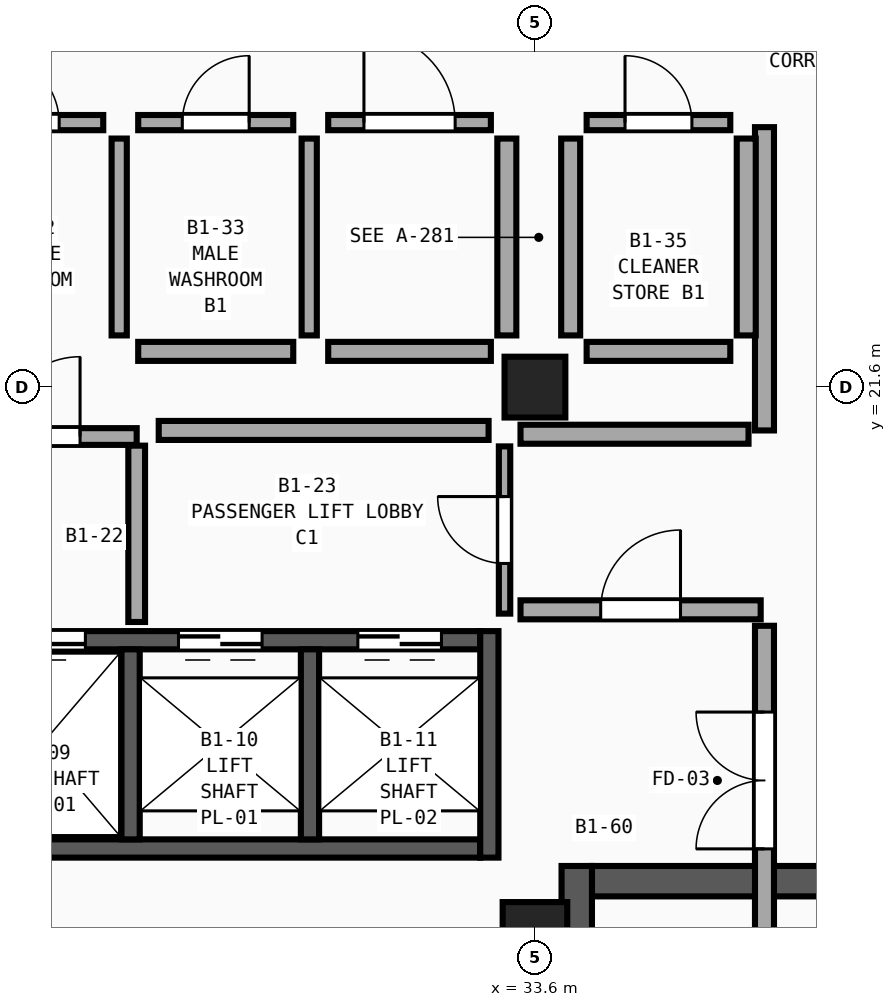
"""IFC4 building model, lengths in metres.
Left out: names, types, materials, properties, quantities, classifications, styles, units other than length and angle.
Written with IfcOpenShell. Run it as: python <this file> out.ifc"""

import sys

from ifc_helpers import new_model, si_unit, direction, frame, frame_2d, origin, origin_2d, place, context, subcontext, project, spatial, rectangle, extrude, element, fill, save


model = new_model("IFC4")
c1 = context("Model", 3, precision=1e-05, world=origin(), true_north=direction((0.0, 1.0)))
c2 = subcontext(c1, "Body", "Model", "MODEL_VIEW")
j1 = project(units=[si_unit("LENGTHUNIT", "METRE"), si_unit("PLANEANGLEUNIT", "RADIAN")], contexts=[c1])
p1 = place(None, origin())
s1 = spatial("IfcSite", under=j1, at=p1, CompositionType="ELEMENT")
p2 = place(p1, origin())
s2 = spatial("IfcBuilding", under=s1, at=p2, CompositionType="ELEMENT")
p3 = place(p2, frame((0.0, 0.0, -5.4)))
s3 = spatial("IfcBuildingStorey", under=s2, at=p3, CompositionType="ELEMENT", Elevation=-5.4)
p4 = place(p3, frame((33.6, 14.4, 0.0), z_axis=(0.0, 0.0, 1.0), x_axis=(1.0, 0.0, 0.0)))
e1 = element("IfcColumn", 1, at=p4, inside=s3, PredefinedType="COLUMN", context=c2, shape_type="SweptSolid", body=[
    extrude(rectangle(XDim=0.85, YDim=0.85, at=origin_2d()), origin(), (0.0, 0.0, 1.0), 5.4),
])
p5 = place(p3, frame((33.6, 21.6, 0.0), z_axis=(0.0, 0.0, 1.0), x_axis=(1.0, 0.0, 0.0)))
e2 = element("IfcColumn", 2, at=p5, inside=s3, PredefinedType="COLUMN", context=c2, shape_type="SweptSolid", body=[
    extrude(rectangle(XDim=0.8, YDim=0.8, at=origin_2d()), origin(), (0.0, 0.0, 1.0), 5.4),
])
p6 = place(p3, frame((34.35, 15.1, 0.0), z_axis=(0.0, 0.0, 1.0), x_axis=(1.0, 0.0, 0.0)))
e3 = element("IfcWall", 3, at=p6, inside=s3, PredefinedType="SHEAR", context=c2, shape_type="SweptSolid", body=[
    extrude(rectangle(XDim=6.9, YDim=0.4, at=frame_2d((3.45, 0.0))), origin(), (0.0, 0.0, 1.0), 5.4),
])
p7 = place(p3, frame((34.15, 15.3, 0.0), z_axis=(0.0, 0.0, 1.0), x_axis=(0.0, -1.0, 0.0)))
e4 = element("IfcWall", 4, at=p7, inside=s3, PredefinedType="SHEAR", context=c2, shape_type="SweptSolid", body=[
    extrude(rectangle(XDim=8.05, YDim=0.4, at=frame_2d((4.025, 0.0))), origin(), (0.0, 0.0, 1.0), 5.4),
])
p8 = place(p3, frame((32.88, 18.27, 0.0), z_axis=(0.0, 0.0, 1.0), x_axis=(-1.0, 0.0, 0.0)))
e5 = element("IfcWall", 5, at=p8, inside=s3, PredefinedType="SHEAR", context=c2, shape_type="SweptSolid", body=[
    extrude(rectangle(XDim=6.82, YDim=0.24, at=frame_2d((3.41, 0.0))), origin(), (0.0, 0.0, 1.0), 5.05),
])
p9 = place(p8, frame((5.195, 0.0, 0.0)))
e6 = element("IfcOpeningElement", 6, at=p9, cuts=e5, PredefinedType="OPENING", context=c2, shape_type="SweptSolid", body=[
    extrude(rectangle(XDim=1.15, YDim=2.25, at=frame_2d((0.575, 1.125))), frame((0.0, 0.14, 0.0), z_axis=(0.0, -1.0, 0.0), x_axis=(1.0, 0.0, 0.0)), (0.0, 0.0, 1.0), 0.28),
])
p10 = place(p8, frame((2.87, 0.0, 0.0)))
e7 = element("IfcOpeningElement", 7, at=p10, cuts=e5, PredefinedType="OPENING", context=c2, shape_type="SweptSolid", body=[
    extrude(rectangle(XDim=1.1, YDim=2.2, at=frame_2d((0.55, 1.1))), frame((0.0, 0.14, 0.0), z_axis=(0.0, -1.0, 0.0), x_axis=(1.0, 0.0, 0.0)), (0.0, 0.0, 1.0), 0.28),
])
p11 = place(p8, frame((0.51, 0.0, 0.0)))
e8 = element("IfcOpeningElement", 8, at=p11, cuts=e5, PredefinedType="OPENING", context=c2, shape_type="SweptSolid", body=[
    extrude(rectangle(XDim=1.1, YDim=2.2, at=frame_2d((0.55, 1.1))), frame((0.0, 0.14, 0.0), z_axis=(0.0, -1.0, 0.0), x_axis=(1.0, 0.0, 0.0)), (0.0, 0.0, 1.0), 0.28),
])
p12 = place(p3, frame((26.06, 15.53, 0.0), z_axis=(0.0, 0.0, 1.0), x_axis=(1.0, 0.0, 0.0)))
e9 = element("IfcWall", 9, at=p12, inside=s3, PredefinedType="SHEAR", context=c2, shape_type="SweptSolid", body=[
    extrude(rectangle(XDim=6.82, YDim=0.24, at=frame_2d((3.41, 0.0))), origin(), (0.0, 0.0, 1.0), 5.05),
])
p13 = place(p3, frame((33.0, 15.41, 0.0), z_axis=(0.0, 0.0, 1.0), x_axis=(0.0, 1.0, 0.0)))
e10 = element("IfcWall", 10, at=p13, inside=s3, PredefinedType="SHEAR", context=c2, shape_type="SweptSolid", body=[
    extrude(rectangle(XDim=2.98, YDim=0.24, at=frame_2d((1.49, 0.0))), origin(), (0.0, 0.0, 1.0), 5.05),
])
for number, where, z_axis, x_axis in (
    (11, (28.28, 15.65, 0.0), (0.0, 0.0, 1.0), (0.0, 1.0, 0.0)),
    (12, (30.64, 15.65, 0.0), (0.0, 0.0, 1.0), (0.0, 1.0, 0.0)),
):
    element("IfcWall", number, at=place(p3, frame(where, z_axis=z_axis, x_axis=x_axis)), inside=s3, PredefinedType="SHEAR", context=c2, shape_type="SweptSolid", body=[
        extrude(rectangle(XDim=2.5, YDim=0.24, at=frame_2d((1.25, 0.0))), origin(), (0.0, 0.0, 1.0), 5.05),
    ])
p14 = place(p3, frame((25.82, 20.95, 0.0), z_axis=(0.0, 0.0, 1.0), x_axis=(1.0, 0.0, 0.0)))
e13 = element("IfcWall", 13, at=p14, inside=s3, PredefinedType="SOLIDWALL", context=c2, shape_type="SweptSolid", body=[
    extrude(rectangle(XDim=2.54, YDim=0.22, at=frame_2d((1.27, 0.0))), origin(), (0.0, 0.0, 1.0), 4.55),
])
p15 = place(p14, frame((0.745, 0.0, 0.0)))
e14 = element("IfcOpeningElement", 14, at=p15, cuts=e13, PredefinedType="OPENING", context=c2, shape_type="SweptSolid", body=[
    extrude(rectangle(XDim=1.05, YDim=2.15, at=frame_2d((0.525, 1.075))), frame((0.0, 0.13, 0.0), z_axis=(0.0, -1.0, 0.0), x_axis=(1.0, 0.0, 0.0)), (0.0, 0.0, 1.0), 0.26),
])
p16 = place(p3, frame((28.36, 18.51, 0.0), z_axis=(0.0, 0.0, 1.0), x_axis=(0.0, 1.0, 0.0)))
e15 = element("IfcWall", 15, at=p16, inside=s3, PredefinedType="SOLIDWALL", context=c2, shape_type="SweptSolid", body=[
    extrude(rectangle(XDim=2.32, YDim=0.22, at=frame_2d((1.16, 0.0))), origin(), (0.0, 0.0, 1.0), 5.05),
])
p17 = place(p3, frame((28.65, 21.03, 0.0), z_axis=(0.0, 0.0, 1.0), x_axis=(1.0, 0.0, 0.0)))
e16 = element("IfcWall", 16, at=p17, inside=s3, PredefinedType="SOLIDWALL", context=c2, shape_type="SweptSolid", body=[
    extrude(rectangle(XDim=4.34, YDim=0.25, at=frame_2d((2.17, 0.0))), origin(), (0.0, 0.0, 1.0), 4.55),
])
p18 = place(p3, frame((36.62, 14.39, 0.0), z_axis=(0.0, 0.0, 1.0), x_axis=(0.0, 1.0, 0.0)))
e17 = element("IfcWall", 17, at=p18, inside=s3, PredefinedType="SOLIDWALL", context=c2, shape_type="SweptSolid", body=[
    extrude(rectangle(XDim=4.07, YDim=0.25, at=frame_2d((2.035, 0.0))), origin(), (0.0, 0.0, 1.0), 5.05),
])
p19 = place(p18, frame((1.135, 0.0, 0.0)))
e18 = element("IfcOpeningElement", 18, at=p19, cuts=e17, PredefinedType="OPENING", context=c2, shape_type="SweptSolid", body=[
    extrude(rectangle(XDim=1.8, YDim=2.3, at=frame_2d((0.9, 1.15))), frame((0.0, 0.145, 0.0), z_axis=(0.0, -1.0, 0.0), x_axis=(1.0, 0.0, 0.0)), (0.0, 0.0, 1.0), 0.29),
])
p20 = place(p3, frame((36.62, 21.03, 0.0), z_axis=(0.0, 0.0, 1.0), x_axis=(0.0, 1.0, 0.0)))
e19 = element("IfcWall", 19, at=p20, inside=s3, PredefinedType="SOLIDWALL", context=c2, shape_type="SweptSolid", body=[
    extrude(rectangle(XDim=3.99, YDim=0.25, at=frame_2d((1.995, 0.0))), origin(), (0.0, 0.0, 1.0), 5.05),
])
p21 = place(p3, frame((33.41, 18.67, 0.0), z_axis=(0.0, 0.0, 1.0), x_axis=(1.0, 0.0, 0.0)))
e20 = element("IfcWall", 20, at=p21, inside=s3, PredefinedType="SOLIDWALL", context=c2, shape_type="SweptSolid", body=[
    extrude(rectangle(XDim=3.16, YDim=0.25, at=frame_2d((1.58, 0.0))), origin(), (0.0, 0.0, 1.0), 5.05),
])
p22 = place(p21, frame((1.055, 0.0, 0.0)))
e21 = element("IfcOpeningElement", 21, at=p22, cuts=e20, PredefinedType="OPENING", context=c2, shape_type="SweptSolid", body=[
    extrude(rectangle(XDim=1.05, YDim=2.15, at=frame_2d((0.525, 1.075))), frame((0.0, 0.145, 0.0), z_axis=(0.0, -1.0, 0.0), x_axis=(1.0, 0.0, 0.0)), (0.0, 0.0, 1.0), 0.29),
])
p23 = place(p3, frame((33.41, 20.98, 0.0), z_axis=(0.0, 0.0, 1.0), x_axis=(1.0, 0.0, 0.0)))
e22 = element("IfcWall", 22, at=p23, inside=s3, PredefinedType="SOLIDWALL", context=c2, shape_type="SweptSolid", body=[
    extrude(rectangle(XDim=3.0, YDim=0.25, at=frame_2d((1.5, 0.0))), origin(), (0.0, 0.0, 1.0), 4.55),
])
p24 = place(p3, frame((33.2, 18.62, 0.0), z_axis=(0.0, 0.0, 1.0), x_axis=(0.0, 1.0, 0.0)))
e23 = element("IfcWall", 23, at=p24, inside=s3, PredefinedType="PARTITIONING", context=c2, shape_type="SweptSolid", body=[
    extrude(rectangle(XDim=2.2, YDim=0.15, at=frame_2d((1.1, 0.0))), origin(), (0.0, 0.0, 1.0), 4.55),
])
p25 = place(p24, frame((0.66, 0.0, 0.0)))
e24 = element("IfcOpeningElement", 24, at=p25, cuts=e23, PredefinedType="OPENING", context=c2, shape_type="SweptSolid", body=[
    extrude(rectangle(XDim=0.88, YDim=2.45, at=frame_2d((0.44, 1.225))), frame((0.0, 0.095, 0.0), z_axis=(0.0, -1.0, 0.0), x_axis=(1.0, 0.0, 0.0)), (0.0, 0.0, 1.0), 0.19),
])
p26 = place(p3, frame((30.88, 25.08, 0.0), z_axis=(0.0, 0.0, 1.0), x_axis=(1.0, 0.0, 0.0)))
e25 = element("IfcWall", 25, at=p26, inside=s3, PredefinedType="PLUMBINGWALL", context=c2, shape_type="SweptSolid", body=[
    extrude(rectangle(XDim=2.14, YDim=0.2, at=frame_2d((1.07, 0.0))), origin(), (0.0, 0.0, 1.0), 5.05),
])
p27 = place(p26, frame((0.47, 0.0, 0.0)))
e26 = element("IfcOpeningElement", 26, at=p27, cuts=e25, PredefinedType="OPENING", context=c2, shape_type="SweptSolid", body=[
    extrude(rectangle(XDim=1.2, YDim=2.45, at=frame_2d((0.6, 1.225))), frame((0.0, 0.12, 0.0), z_axis=(0.0, -1.0, 0.0), x_axis=(1.0, 0.0, 0.0)), (0.0, 0.0, 1.0), 0.24),
])
p28 = place(p3, frame((25.88, 25.08, 0.0), z_axis=(0.0, 0.0, 1.0), x_axis=(1.0, 0.0, 0.0)))
e27 = element("IfcWall", 27, at=p28, inside=s3, PredefinedType="PLUMBINGWALL", context=c2, shape_type="SweptSolid", body=[
    extrude(rectangle(XDim=2.04, YDim=0.2, at=frame_2d((1.02, 0.0))), origin(), (0.0, 0.0, 1.0), 5.05),
])
p29 = place(p28, frame((0.58, 0.0, 0.0)))
e28 = element("IfcOpeningElement", 28, at=p29, cuts=e27, PredefinedType="OPENING", context=c2, shape_type="SweptSolid", body=[
    extrude(rectangle(XDim=0.88, YDim=2.05, at=frame_2d((0.44, 1.025))), frame((0.0, 0.12, 0.0), z_axis=(0.0, -1.0, 0.0), x_axis=(1.0, 0.0, 0.0)), (0.0, 0.0, 1.0), 0.24),
])
p30 = place(p3, frame((28.38, 25.08, 0.0), z_axis=(0.0, 0.0, 1.0), x_axis=(1.0, 0.0, 0.0)))
e29 = element("IfcWall", 29, at=p30, inside=s3, PredefinedType="PLUMBINGWALL", context=c2, shape_type="SweptSolid", body=[
    extrude(rectangle(XDim=2.04, YDim=0.2, at=frame_2d((1.02, 0.0))), origin(), (0.0, 0.0, 1.0), 5.05),
])
p31 = place(p30, frame((0.58, 0.0, 0.0)))
e30 = element("IfcOpeningElement", 30, at=p31, cuts=e29, PredefinedType="OPENING", context=c2, shape_type="SweptSolid", body=[
    extrude(rectangle(XDim=0.88, YDim=2.05, at=frame_2d((0.44, 1.025))), frame((0.0, 0.12, 0.0), z_axis=(0.0, -1.0, 0.0), x_axis=(1.0, 0.0, 0.0)), (0.0, 0.0, 1.0), 0.24),
])
p32 = place(p3, frame((34.28, 25.08, 0.0), z_axis=(0.0, 0.0, 1.0), x_axis=(1.0, 0.0, 0.0)))
e31 = element("IfcWall", 31, at=p32, inside=s3, PredefinedType="PLUMBINGWALL", context=c2, shape_type="SweptSolid", body=[
    extrude(rectangle(XDim=1.89, YDim=0.2, at=frame_2d((0.945, 0.0))), origin(), (0.0, 0.0, 1.0), 5.05),
])
p33 = place(p32, frame((0.505, 0.0, 0.0)))
e32 = element("IfcOpeningElement", 32, at=p33, cuts=e31, PredefinedType="OPENING", context=c2, shape_type="SweptSolid", body=[
    extrude(rectangle(XDim=0.88, YDim=2.13, at=frame_2d((0.44, 1.065))), frame((0.0, 0.12, 0.0), z_axis=(0.0, -1.0, 0.0), x_axis=(1.0, 0.0, 0.0)), (0.0, 0.0, 1.0), 0.24),
])
for number, where, z_axis, x_axis in (
    (33, (28.13, 22.28, 0.0), (0.0, 0.0, 1.0), (0.0, 1.0, 0.0)),
    (34, (30.63, 22.28, 0.0), (0.0, 0.0, 1.0), (0.0, 1.0, 0.0)),
):
    element("IfcWall", number, at=place(p3, frame(where, z_axis=z_axis, x_axis=x_axis)), inside=s3, PredefinedType="PLUMBINGWALL", context=c2, shape_type="SweptSolid", body=[
        extrude(rectangle(XDim=2.59, YDim=0.2, at=frame_2d((1.295, 0.0))), origin(), (0.0, 0.0, 1.0), 5.05),
    ])
p34 = place(p3, frame((33.23, 22.28, 0.0), z_axis=(0.0, 0.0, 1.0), x_axis=(0.0, 1.0, 0.0)))
e35 = element("IfcWall", 35, at=p34, inside=s3, PredefinedType="SOLIDWALL", context=c2, shape_type="SweptSolid", body=[
    extrude(rectangle(XDim=2.59, YDim=0.25, at=frame_2d((1.295, 0.0))), origin(), (0.0, 0.0, 1.0), 4.55),
])
p35 = place(p3, frame((36.38, 22.28, 0.0), z_axis=(0.0, 0.0, 1.0), x_axis=(0.0, 1.0, 0.0)))
e36 = element("IfcWall", 36, at=p35, inside=s3, PredefinedType="SOLIDWALL", context=c2, shape_type="SweptSolid", body=[
    extrude(rectangle(XDim=2.59, YDim=0.25, at=frame_2d((1.295, 0.0))), origin(), (0.0, 0.0, 1.0), 5.05),
])
p36 = place(p3, frame((34.07, 22.28, 0.0), z_axis=(0.0, 0.0, 1.0), x_axis=(0.0, 1.0, 0.0)))
e37 = element("IfcWall", 37, at=p36, inside=s3, PredefinedType="SOLIDWALL", context=c2, shape_type="SweptSolid", body=[
    extrude(rectangle(XDim=2.59, YDim=0.25, at=frame_2d((1.295, 0.0))), origin(), (0.0, 0.0, 1.0), 4.55),
])
p37 = place(p3, frame((30.88, 22.07, 0.0), z_axis=(0.0, 0.0, 1.0), x_axis=(1.0, 0.0, 0.0)))
e38 = element("IfcWall", 38, at=p37, inside=s3, PredefinedType="SOLIDWALL", context=c2, shape_type="SweptSolid", body=[
    extrude(rectangle(XDim=2.14, YDim=0.25, at=frame_2d((1.07, 0.0))), origin(), (0.0, 0.0, 1.0), 4.55),
])
p38 = place(p3, frame((28.38, 22.07, 0.0), z_axis=(0.0, 0.0, 1.0), x_axis=(1.0, 0.0, 0.0)))
e39 = element("IfcWall", 39, at=p38, inside=s3, PredefinedType="SOLIDWALL", context=c2, shape_type="SweptSolid", body=[
    extrude(rectangle(XDim=2.04, YDim=0.25, at=frame_2d((1.02, 0.0))), origin(), (0.0, 0.0, 1.0), 4.55),
])
p39 = place(p3, frame((34.28, 22.07, 0.0), z_axis=(0.0, 0.0, 1.0), x_axis=(1.0, 0.0, 0.0)))
e40 = element("IfcWall", 40, at=p39, inside=s3, PredefinedType="SOLIDWALL", context=c2, shape_type="SweptSolid", body=[
    extrude(rectangle(XDim=1.89, YDim=0.25, at=frame_2d((0.945, 0.0))), origin(), (0.0, 0.0, 1.0), 4.55),
])
p40 = place(p9, origin())
e41 = element("IfcDoor", 41, at=p40, inside=s3, OperationType="SLIDING_TO_LEFT", PredefinedType="DOOR", context=c2, shape_type="SweptSolid", body=[
    extrude(rectangle(XDim=1.15, YDim=2.25, at=frame_2d((0.575, 1.125))), frame((0.0, 0.025, 0.0), z_axis=(0.0, -1.0, 0.0), x_axis=(1.0, 0.0, 0.0)), (0.0, 0.0, 1.0), 0.05),
])
fill(e6, e41)
p41 = place(p10, origin())
e42 = element("IfcDoor", 42, at=p41, inside=s3, OperationType="DOUBLE_DOOR_SLIDING", PredefinedType="DOOR", context=c2, shape_type="SweptSolid", body=[
    extrude(rectangle(XDim=1.1, YDim=2.2, at=frame_2d((0.55, 1.1))), frame((0.0, 0.025, 0.0), z_axis=(0.0, -1.0, 0.0), x_axis=(1.0, 0.0, 0.0)), (0.0, 0.0, 1.0), 0.05),
])
fill(e7, e42)
p42 = place(p11, origin())
e43 = element("IfcDoor", 43, at=p42, inside=s3, OperationType="DOUBLE_DOOR_SLIDING", PredefinedType="DOOR", context=c2, shape_type="SweptSolid", body=[
    extrude(rectangle(XDim=1.1, YDim=2.2, at=frame_2d((0.55, 1.1))), frame((0.0, 0.025, 0.0), z_axis=(0.0, -1.0, 0.0), x_axis=(1.0, 0.0, 0.0)), (0.0, 0.0, 1.0), 0.05),
])
fill(e8, e43)
p43 = place(p15, origin())
e44 = element("IfcDoor", 44, at=p43, inside=s3, OperationType="SINGLE_SWING_RIGHT", PredefinedType="DOOR", context=c2, shape_type="SweptSolid", body=[
    extrude(rectangle(XDim=1.05, YDim=2.15, at=frame_2d((0.525, 1.075))), frame((0.0, 0.025, 0.0), z_axis=(0.0, -1.0, 0.0), x_axis=(1.0, 0.0, 0.0)), (0.0, 0.0, 1.0), 0.05),
])
fill(e14, e44)
p44 = place(p19, origin())
e45 = element("IfcDoor", 45, at=p44, inside=s3, OperationType="DOUBLE_DOOR_SINGLE_SWING", PredefinedType="DOOR", context=c2, shape_type="SweptSolid", body=[
    extrude(rectangle(XDim=1.8, YDim=2.3, at=frame_2d((0.9, 1.15))), frame((0.0, 0.025, 0.0), z_axis=(0.0, -1.0, 0.0), x_axis=(1.0, 0.0, 0.0)), (0.0, 0.0, 1.0), 0.05),
])
fill(e18, e45)
p45 = place(p22, origin())
e46 = element("IfcDoor", 46, at=p45, inside=s3, OperationType="SINGLE_SWING_RIGHT", PredefinedType="DOOR", context=c2, shape_type="SweptSolid", body=[
    extrude(rectangle(XDim=1.05, YDim=2.15, at=frame_2d((0.525, 1.075))), frame((0.0, 0.025, 0.0), z_axis=(0.0, -1.0, 0.0), x_axis=(1.0, 0.0, 0.0)), (0.0, 0.0, 1.0), 0.05),
])
fill(e21, e46)
p46 = place(p25, origin())
e47 = element("IfcDoor", 47, at=p46, inside=s3, OperationType="SINGLE_SWING_RIGHT", PredefinedType="DOOR", context=c2, shape_type="SweptSolid", body=[
    extrude(rectangle(XDim=0.88, YDim=2.45, at=frame_2d((0.44, 1.225))), frame((0.0, 0.025, 0.0), z_axis=(0.0, -1.0, 0.0), x_axis=(1.0, 0.0, 0.0)), (0.0, 0.0, 1.0), 0.05),
])
fill(e24, e47)
p47 = place(p27, origin())
e48 = element("IfcDoor", 48, at=p47, inside=s3, OperationType="SINGLE_SWING_LEFT", PredefinedType="DOOR", context=c2, shape_type="SweptSolid", body=[
    extrude(rectangle(XDim=1.2, YDim=2.45, at=frame_2d((0.6, 1.225))), frame((0.0, 0.025, 0.0), z_axis=(0.0, -1.0, 0.0), x_axis=(1.0, 0.0, 0.0)), (0.0, 0.0, 1.0), 0.05),
])
fill(e26, e48)
p48 = place(p29, origin())
e49 = element("IfcDoor", 49, at=p48, inside=s3, OperationType="SINGLE_SWING_LEFT", PredefinedType="DOOR", context=c2, shape_type="SweptSolid", body=[
    extrude(rectangle(XDim=0.88, YDim=2.05, at=frame_2d((0.44, 1.025))), frame((0.0, 0.025, 0.0), z_axis=(0.0, -1.0, 0.0), x_axis=(1.0, 0.0, 0.0)), (0.0, 0.0, 1.0), 0.05),
])
fill(e28, e49)
p49 = place(p31, origin())
e50 = element("IfcDoor", 50, at=p49, inside=s3, OperationType="SINGLE_SWING_RIGHT", PredefinedType="DOOR", context=c2, shape_type="SweptSolid", body=[
    extrude(rectangle(XDim=0.88, YDim=2.05, at=frame_2d((0.44, 1.025))), frame((0.0, 0.025, 0.0), z_axis=(0.0, -1.0, 0.0), x_axis=(1.0, 0.0, 0.0)), (0.0, 0.0, 1.0), 0.05),
])
fill(e30, e50)
p50 = place(p33, origin())
e51 = element("IfcDoor", 51, at=p50, inside=s3, OperationType="SINGLE_SWING_LEFT", PredefinedType="DOOR", context=c2, shape_type="SweptSolid", body=[
    extrude(rectangle(XDim=0.88, YDim=2.13, at=frame_2d((0.44, 1.065))), frame((0.0, 0.025, 0.0), z_axis=(0.0, -1.0, 0.0), x_axis=(1.0, 0.0, 0.0)), (0.0, 0.0, 1.0), 0.05),
])
fill(e32, e51)
save(model, sys.argv[1])
